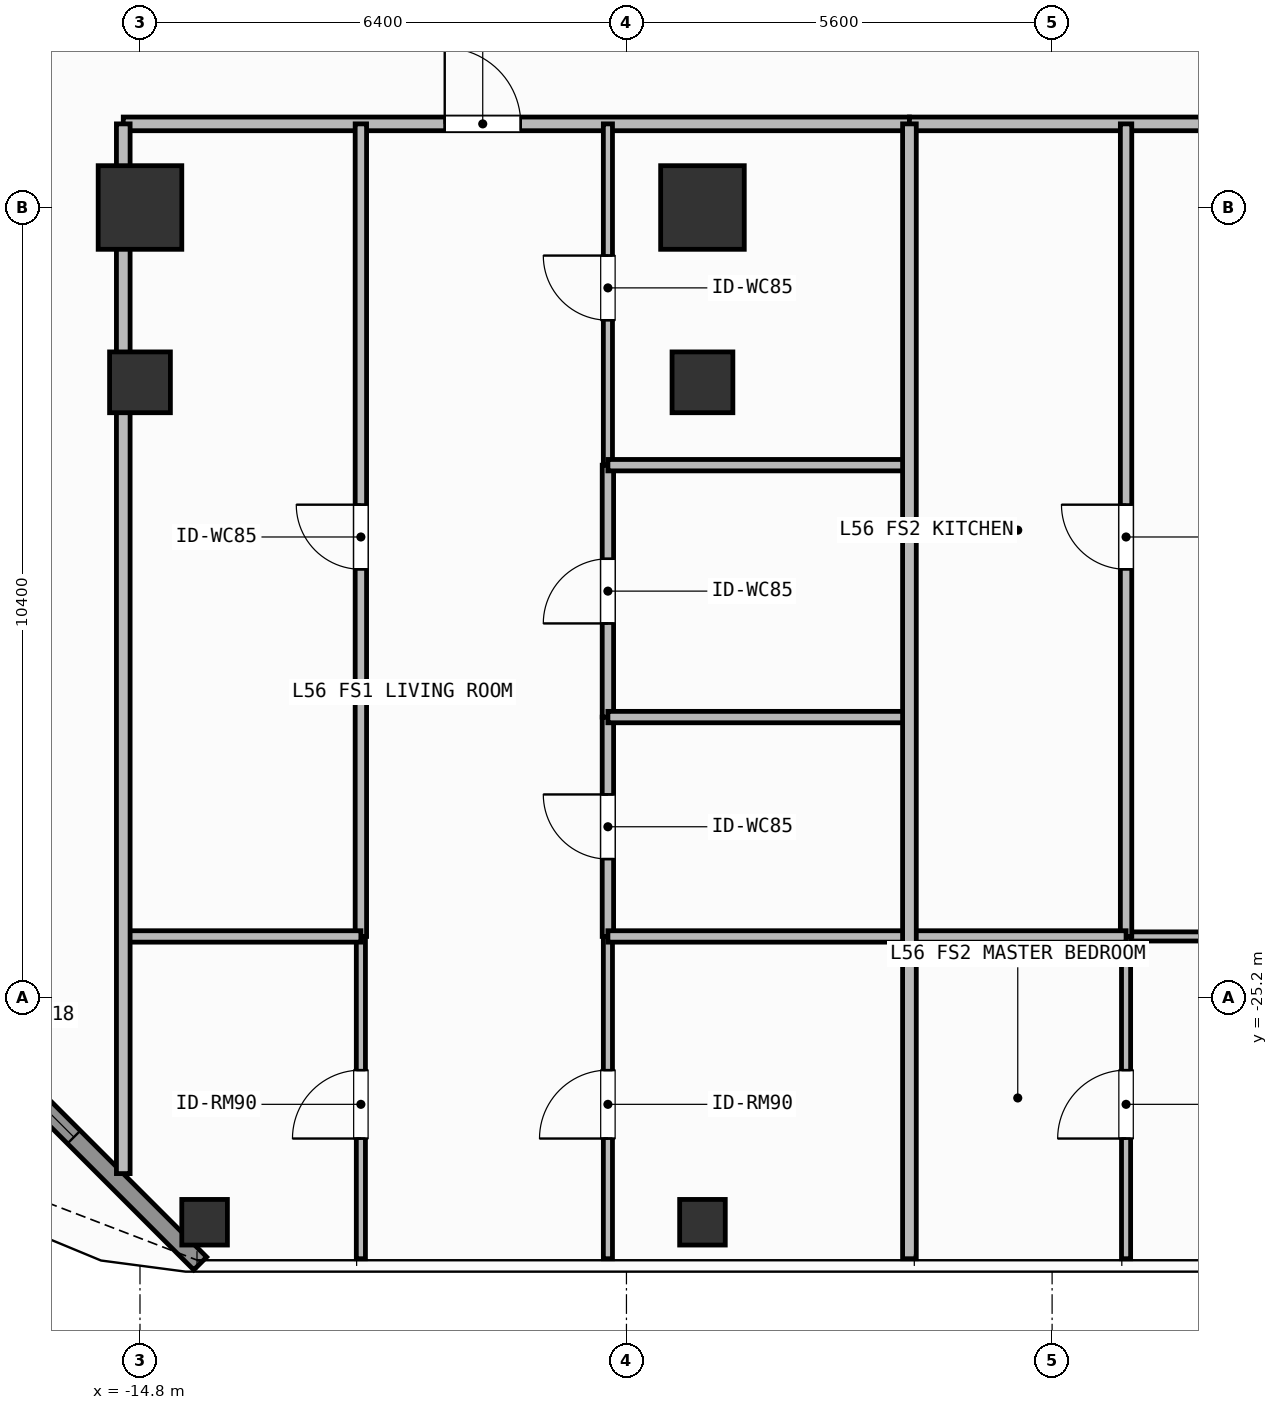
"""IFC4 building model, lengths in metres.
Left out: names, types, materials, properties, quantities, classifications, styles, units other than length and angle.
Written with IfcOpenShell. Run it as: python <this file> out.ifc"""

import sys

from ifc_helpers import new_model, si_unit, direction, frame, frame_2d, origin, origin_2d, place, context, subcontext, project, spatial, rectangle, hollow_rectangle, extrude, element, fill, save


model = new_model("IFC4")
c1 = context("Model", 3, precision=1e-05, world=origin(), true_north=direction((0.0, 1.0)))
c2 = subcontext(c1, "Body", "Model", "MODEL_VIEW")
j1 = project(units=[si_unit("LENGTHUNIT", "METRE"), si_unit("PLANEANGLEUNIT", "RADIAN")], contexts=[c1])
p1 = place(None, origin())
s1 = spatial("IfcSite", under=j1, at=p1, CompositionType="ELEMENT")
p2 = place(p1, origin())
s2 = spatial("IfcBuilding", under=s1, at=p2, CompositionType="ELEMENT")
p3 = place(p2, frame((0.0, 0.0, 227.4)))
s3 = spatial("IfcBuildingStorey", under=s2, at=p3, CompositionType="ELEMENT", Elevation=227.4)
for number, where, z_axis, x_axis in (
    (1, (-14.8, -14.8, 0.0), (0.0, 0.0, 1.0), (1.0, 0.0, 0.0)),
    (2, (-7.4, -14.8, 0.0), (0.0, 0.0, 1.0), (1.0, 0.0, 0.0)),
):
    element("IfcColumn", number, at=place(p3, frame(where, z_axis=z_axis, x_axis=x_axis)), inside=s3, PredefinedType="COLUMN", context=c2, shape_type="SweptSolid", body=[
        extrude(rectangle(XDim=1.1, YDim=1.1, at=origin_2d()), origin(), (0.0, 0.0, 1.0), 3.9),
    ])
for number, where, z_axis, x_axis in (
    (3, (-14.8, -17.1, 0.0), (0.0, 0.0, 1.0), (1.0, 0.0, 0.0)),
    (4, (-7.4, -17.1, 0.0), (0.0, 0.0, 1.0), (1.0, 0.0, 0.0)),
):
    element("IfcColumn", number, at=place(p3, frame(where, z_axis=z_axis, x_axis=x_axis)), inside=s3, PredefinedType="COLUMN", context=c2, shape_type="SweptSolid", body=[
        extrude(hollow_rectangle(XDim=0.8, YDim=0.8, WallThickness=0.036, at=origin_2d()), origin(), (0.0, 0.0, 1.0), 3.9),
    ])
for number, where, z_axis, x_axis in (
    (5, (-13.95, -28.15, 0.0), (0.0, 0.0, 1.0), (1.0, 0.0, 0.0)),
    (6, (-7.4, -28.15, 0.0), (0.0, 0.0, 1.0), (1.0, 0.0, 0.0)),
):
    element("IfcColumn", number, at=place(p3, frame(where, z_axis=z_axis, x_axis=x_axis)), inside=s3, PredefinedType="COLUMN", context=c2, shape_type="SweptSolid", body=[
        extrude(hollow_rectangle(XDim=0.6, YDim=0.6, WallThickness=0.028, at=origin_2d()), origin(), (0.0, 0.0, 1.0), 3.9),
    ])
p4 = place(p3, frame((-14.008, -28.692, 0.0), z_axis=(0.0, 0.0, 1.0), x_axis=(-0.707106781187, 0.707106781187, 0.0)))
e7 = element("IfcWall", 7, at=p4, inside=s3, PredefinedType="SOLIDWALL", context=c2, shape_type="SweptSolid", body=[
    extrude(rectangle(XDim=6.201, YDim=0.24, at=frame_2d((3.101, 0.0))), origin(), (0.0, 0.0, 1.0), 3.68),
])
p5 = place(p4, frame((2.351, 0.0, 0.8)))
e8 = element("IfcOpeningElement", 8, at=p5, cuts=e7, PredefinedType="OPENING", context=c2, shape_type="SweptSolid", body=[
    extrude(rectangle(XDim=1.5, YDim=1.85, at=frame_2d((0.75, 0.925))), frame((0.0, 0.13, 0.0), z_axis=(0.0, -1.0, 0.0), x_axis=(1.0, 0.0, 0.0)), (0.0, 0.0, 1.0), 0.26),
])
p6 = place(p3, frame((-15.02, -13.7, 0.0), z_axis=(0.0, 0.0, 1.0), x_axis=(1.0, 0.0, 0.0)))
e9 = element("IfcWall", 9, at=p6, inside=s3, PredefinedType="PARTITIONING", context=c2, shape_type="SweptSolid", body=[
    extrude(rectangle(XDim=10.343, YDim=0.18, at=frame_2d((5.171, 0.0))), origin(), (0.0, 0.0, 1.0), 3.68),
])
p7 = place(p6, frame((4.229, 0.0, 0.0)))
e10 = element("IfcOpeningElement", 10, at=p7, cuts=e9, PredefinedType="OPENING", context=c2, shape_type="SweptSolid", body=[
    extrude(rectangle(XDim=1.0, YDim=2.2, at=frame_2d((0.5, 1.1))), frame((0.0, 0.1, 0.0), z_axis=(0.0, -1.0, 0.0), x_axis=(1.0, 0.0, 0.0)), (0.0, 0.0, 1.0), 0.2),
])
p8 = place(p3, frame((-11.894, -24.39, 0.0), z_axis=(0.0, 0.0, 1.0), x_axis=(0.0, 1.0, 0.0)))
e11 = element("IfcWall", 11, at=p8, inside=s3, PredefinedType="PARTITIONING", context=c2, shape_type="SweptSolid", body=[
    extrude(rectangle(XDim=10.69, YDim=0.15, at=frame_2d((5.345, 0.0))), origin(), (0.0, 0.0, 1.0), 3.68),
])
p9 = place(p8, frame((4.83, 0.0, 0.0)))
e12 = element("IfcOpeningElement", 12, at=p9, cuts=e11, PredefinedType="OPENING", context=c2, shape_type="SweptSolid", body=[
    extrude(rectangle(XDim=0.85, YDim=2.1, at=frame_2d((0.425, 1.05))), frame((0.0, 0.085, 0.0), z_axis=(0.0, -1.0, 0.0), x_axis=(1.0, 0.0, 0.0)), (0.0, 0.0, 1.0), 0.17),
])
p10 = place(p3, frame((-11.894, -28.63, 0.0), z_axis=(0.0, 0.0, 1.0), x_axis=(0.0, 1.0, 0.0)))
e13 = element("IfcWall", 13, at=p10, inside=s3, PredefinedType="PARTITIONING", context=c2, shape_type="SweptSolid", body=[
    extrude(rectangle(XDim=4.24, YDim=0.12, at=frame_2d((2.12, 0.0))), origin(), (0.0, 0.0, 1.0), 3.68),
])
p11 = place(p10, frame((1.581, 0.0, 0.0)))
e14 = element("IfcOpeningElement", 14, at=p11, cuts=e13, PredefinedType="OPENING", context=c2, shape_type="SweptSolid", body=[
    extrude(rectangle(XDim=0.9, YDim=2.1, at=frame_2d((0.45, 1.05))), frame((0.0, 0.07, 0.0), z_axis=(0.0, -1.0, 0.0), x_axis=(1.0, 0.0, 0.0)), (0.0, 0.0, 1.0), 0.14),
])
p12 = place(p3, frame((-8.644, -24.39, 0.0), z_axis=(0.0, 0.0, 1.0), x_axis=(0.0, 1.0, 0.0)))
e15 = element("IfcWall", 15, at=p12, inside=s3, PredefinedType="PARTITIONING", context=c2, shape_type="SweptSolid", body=[
    extrude(rectangle(XDim=2.886, YDim=0.15, at=frame_2d((1.443, 0.0))), origin(), (0.0, 0.0, 1.0), 3.68),
])
p13 = place(p12, frame((1.018, 0.0, 0.0)))
e16 = element("IfcOpeningElement", 16, at=p13, cuts=e15, PredefinedType="OPENING", context=c2, shape_type="SweptSolid", body=[
    extrude(rectangle(XDim=0.85, YDim=2.1, at=frame_2d((0.425, 1.05))), frame((0.0, 0.085, 0.0), z_axis=(0.0, -1.0, 0.0), x_axis=(1.0, 0.0, 0.0)), (0.0, 0.0, 1.0), 0.17),
])
p14 = place(p3, frame((-8.644, -21.504, 0.0), z_axis=(0.0, 0.0, 1.0), x_axis=(0.0, 1.0, 0.0)))
e17 = element("IfcWall", 17, at=p14, inside=s3, PredefinedType="PARTITIONING", context=c2, shape_type="SweptSolid", body=[
    extrude(rectangle(XDim=3.314, YDim=0.15, at=frame_2d((1.657, 0.0))), origin(), (0.0, 0.0, 1.0), 3.68),
])
p15 = place(p14, frame((1.232, 0.0, 0.0)))
e18 = element("IfcOpeningElement", 18, at=p15, cuts=e17, PredefinedType="OPENING", context=c2, shape_type="SweptSolid", body=[
    extrude(rectangle(XDim=0.85, YDim=2.1, at=frame_2d((0.425, 1.05))), frame((0.0, 0.085, 0.0), z_axis=(0.0, -1.0, 0.0), x_axis=(1.0, 0.0, 0.0)), (0.0, 0.0, 1.0), 0.17),
])
p16 = place(p3, frame((-8.644, -18.19, 0.0), z_axis=(0.0, 0.0, 1.0), x_axis=(0.0, 1.0, 0.0)))
e19 = element("IfcWall", 19, at=p16, inside=s3, PredefinedType="PARTITIONING", context=c2, shape_type="SweptSolid", body=[
    extrude(rectangle(XDim=4.49, YDim=0.12, at=frame_2d((2.245, 0.0))), origin(), (0.0, 0.0, 1.0), 3.68),
])
p17 = place(p16, frame((1.907, 0.0, 0.0)))
e20 = element("IfcOpeningElement", 20, at=p17, cuts=e19, PredefinedType="OPENING", context=c2, shape_type="SweptSolid", body=[
    extrude(rectangle(XDim=0.85, YDim=2.1, at=frame_2d((0.425, 1.05))), frame((0.0, 0.07, 0.0), z_axis=(0.0, -1.0, 0.0), x_axis=(1.0, 0.0, 0.0)), (0.0, 0.0, 1.0), 0.14),
])
p18 = place(p3, frame((-8.644, -28.63, 0.0), z_axis=(0.0, 0.0, 1.0), x_axis=(0.0, 1.0, 0.0)))
e21 = element("IfcWall", 21, at=p18, inside=s3, PredefinedType="PARTITIONING", context=c2, shape_type="SweptSolid", body=[
    extrude(rectangle(XDim=4.24, YDim=0.12, at=frame_2d((2.12, 0.0))), origin(), (0.0, 0.0, 1.0), 3.68),
])
p19 = place(p18, frame((1.581, 0.0, 0.0)))
e22 = element("IfcOpeningElement", 22, at=p19, cuts=e21, PredefinedType="OPENING", context=c2, shape_type="SweptSolid", body=[
    extrude(rectangle(XDim=0.9, YDim=2.1, at=frame_2d((0.45, 1.05))), frame((0.0, 0.07, 0.0), z_axis=(0.0, -1.0, 0.0), x_axis=(1.0, 0.0, 0.0)), (0.0, 0.0, 1.0), 0.14),
])
p20 = place(p3, frame((-4.677, -13.7, 0.0), z_axis=(0.0, 0.0, 1.0), x_axis=(1.0, 0.0, 0.0)))
e23 = element("IfcWall", 23, at=p20, inside=s3, PredefinedType="PARTITIONING", context=c2, shape_type="SweptSolid", body=[
    extrude(rectangle(XDim=15.905, YDim=0.18, at=frame_2d((7.953, 0.0))), origin(), (0.0, 0.0, 1.0), 3.68),
])
p21 = place(p20, frame((6.03, 0.0, 0.0)))
e24 = element("IfcOpeningElement", 24, at=p21, cuts=e23, PredefinedType="OPENING", context=c2, shape_type="SweptSolid", body=[
    extrude(rectangle(XDim=1.0, YDim=2.2, at=frame_2d((0.5, 1.1))), frame((0.0, 0.1, 0.0), z_axis=(0.0, -1.0, 0.0), x_axis=(1.0, 0.0, 0.0)), (0.0, 0.0, 1.0), 0.2),
])
p22 = place(p3, frame((-1.827, -24.39, 0.0), z_axis=(0.0, 0.0, 1.0), x_axis=(1.0, 0.0, 0.0)))
e25 = element("IfcWall", 25, at=p22, inside=s3, PredefinedType="PARTITIONING", context=c2, shape_type="SweptSolid", body=[
    extrude(rectangle(XDim=7.252, YDim=0.12, at=frame_2d((3.626, 0.0))), origin(), (0.0, 0.0, 1.0), 3.68),
])
p23 = place(p22, frame((3.176, 0.0, 0.0)))
e26 = element("IfcOpeningElement", 26, at=p23, cuts=e25, PredefinedType="OPENING", context=c2, shape_type="SweptSolid", body=[
    extrude(rectangle(XDim=0.9, YDim=2.1, at=frame_2d((0.45, 1.05))), frame((0.0, 0.07, 0.0), z_axis=(0.0, -1.0, 0.0), x_axis=(1.0, 0.0, 0.0)), (0.0, 0.0, 1.0), 0.14),
])
p24 = place(p3, frame((-1.827, -24.39, 0.0), z_axis=(0.0, 0.0, 1.0), x_axis=(0.0, 1.0, 0.0)))
e27 = element("IfcWall", 27, at=p24, inside=s3, PredefinedType="PARTITIONING", context=c2, shape_type="SweptSolid", body=[
    extrude(rectangle(XDim=10.69, YDim=0.15, at=frame_2d((5.345, 0.0))), origin(), (0.0, 0.0, 1.0), 3.68),
])
p25 = place(p24, frame((4.83, 0.0, 0.0)))
e28 = element("IfcOpeningElement", 28, at=p25, cuts=e27, PredefinedType="OPENING", context=c2, shape_type="SweptSolid", body=[
    extrude(rectangle(XDim=0.85, YDim=2.1, at=frame_2d((0.425, 1.05))), frame((0.0, 0.085, 0.0), z_axis=(0.0, -1.0, 0.0), x_axis=(1.0, 0.0, 0.0)), (0.0, 0.0, 1.0), 0.17),
])
p26 = place(p3, frame((-1.827, -28.63, 0.0), z_axis=(0.0, 0.0, 1.0), x_axis=(0.0, 1.0, 0.0)))
e29 = element("IfcWall", 29, at=p26, inside=s3, PredefinedType="PARTITIONING", context=c2, shape_type="SweptSolid", body=[
    extrude(rectangle(XDim=4.24, YDim=0.12, at=frame_2d((2.12, 0.0))), origin(), (0.0, 0.0, 1.0), 3.68),
])
p27 = place(p26, frame((1.581, 0.0, 0.0)))
e30 = element("IfcOpeningElement", 30, at=p27, cuts=e29, PredefinedType="OPENING", context=c2, shape_type="SweptSolid", body=[
    extrude(rectangle(XDim=0.9, YDim=2.1, at=frame_2d((0.45, 1.05))), frame((0.0, 0.07, 0.0), z_axis=(0.0, -1.0, 0.0), x_axis=(1.0, 0.0, 0.0)), (0.0, 0.0, 1.0), 0.14),
])
p28 = place(p3, frame((-15.02, -24.39, 0.0), z_axis=(0.0, 0.0, 1.0), x_axis=(1.0, 0.0, 0.0)))
e31 = element("IfcWall", 31, at=p28, inside=s3, PredefinedType="PARTITIONING", context=c2, shape_type="SweptSolid", body=[
    extrude(rectangle(XDim=3.126, YDim=0.15, at=frame_2d((1.563, 0.0))), origin(), (0.0, 0.0, 1.0), 3.68),
])
for number, where, z_axis, x_axis in (
    (32, (-8.644, -21.504, 0.0), (0.0, 0.0, 1.0), (1.0, 0.0, 0.0)),
    (33, (-8.644, -18.19, 0.0), (0.0, 0.0, 1.0), (1.0, 0.0, 0.0)),
    (34, (-8.644, -24.39, 0.0), (0.0, 0.0, 1.0), (1.0, 0.0, 0.0)),
):
    element("IfcWall", number, at=place(p3, frame(where, z_axis=z_axis, x_axis=x_axis)), inside=s3, PredefinedType="PARTITIONING", context=c2, shape_type="SweptSolid", body=[
        extrude(rectangle(XDim=3.967, YDim=0.15, at=frame_2d((1.983, 0.0))), origin(), (0.0, 0.0, 1.0), 3.68),
    ])
p29 = place(p3, frame((-4.677, -24.39, 0.0), z_axis=(0.0, 0.0, 1.0), x_axis=(1.0, 0.0, 0.0)))
e35 = element("IfcWall", 35, at=p29, inside=s3, PredefinedType="PARTITIONING", context=c2, shape_type="SweptSolid", body=[
    extrude(rectangle(XDim=2.85, YDim=0.15, at=frame_2d((1.425, 0.0))), origin(), (0.0, 0.0, 1.0), 3.68),
])
p30 = place(p3, frame((-4.677, -28.63, 0.0), z_axis=(0.0, 0.0, 1.0), x_axis=(0.0, 1.0, 0.0)))
e36 = element("IfcWall", 36, at=p30, inside=s3, PredefinedType="PARTITIONING", context=c2, shape_type="SweptSolid", body=[
    extrude(rectangle(XDim=14.93, YDim=0.18, at=frame_2d((7.465, 0.0))), origin(), (0.0, 0.0, 1.0), 3.68),
])
p31 = place(p3, frame((-15.02, -27.51, 0.0), z_axis=(0.0, 0.0, 1.0), x_axis=(0.0, 1.0, 0.0)))
e37 = element("IfcWall", 37, at=p31, inside=s3, PredefinedType="PARTITIONING", context=c2, shape_type="SweptSolid", body=[
    extrude(rectangle(XDim=13.81, YDim=0.18, at=frame_2d((6.905, 0.0))), origin(), (0.0, 0.0, 1.0), 3.68),
])
p32 = place(p5, origin())
e38 = element("IfcWindow", 38, at=p32, inside=s3, PartitioningType="SINGLE_PANEL", PredefinedType="WINDOW", context=c2, shape_type="SweptSolid", body=[
    extrude(rectangle(XDim=1.5, YDim=1.85, at=frame_2d((0.75, 0.925))), frame((0.0, 0.03, 0.0), z_axis=(0.0, -1.0, 0.0), x_axis=(1.0, 0.0, 0.0)), (0.0, 0.0, 1.0), 0.06),
])
fill(e8, e38)
p33 = place(p7, origin())
e39 = element("IfcDoor", 39, at=p33, inside=s3, OperationType="SINGLE_SWING_LEFT", PredefinedType="DOOR", context=c2, shape_type="SweptSolid", body=[
    extrude(rectangle(XDim=1.0, YDim=2.2, at=frame_2d((0.5, 1.1))), frame((0.0, 0.025, 0.0), z_axis=(0.0, -1.0, 0.0), x_axis=(1.0, 0.0, 0.0)), (0.0, 0.0, 1.0), 0.05),
])
fill(e10, e39)
p34 = place(p9, origin())
e40 = element("IfcDoor", 40, at=p34, inside=s3, OperationType="SINGLE_SWING_RIGHT", PredefinedType="DOOR", context=c2, shape_type="SweptSolid", body=[
    extrude(rectangle(XDim=0.85, YDim=2.1, at=frame_2d((0.425, 1.05))), frame((0.0, 0.025, 0.0), z_axis=(0.0, -1.0, 0.0), x_axis=(1.0, 0.0, 0.0)), (0.0, 0.0, 1.0), 0.05),
])
fill(e12, e40)
p35 = place(p11, origin())
e41 = element("IfcDoor", 41, at=p35, inside=s3, OperationType="SINGLE_SWING_LEFT", PredefinedType="DOOR", context=c2, shape_type="SweptSolid", body=[
    extrude(rectangle(XDim=0.9, YDim=2.1, at=frame_2d((0.45, 1.05))), frame((0.0, 0.025, 0.0), z_axis=(0.0, -1.0, 0.0), x_axis=(1.0, 0.0, 0.0)), (0.0, 0.0, 1.0), 0.05),
])
fill(e14, e41)
p36 = place(p13, origin())
e42 = element("IfcDoor", 42, at=p36, inside=s3, OperationType="SINGLE_SWING_RIGHT", PredefinedType="DOOR", context=c2, shape_type="SweptSolid", body=[
    extrude(rectangle(XDim=0.85, YDim=2.1, at=frame_2d((0.425, 1.05))), frame((0.0, 0.025, 0.0), z_axis=(0.0, -1.0, 0.0), x_axis=(1.0, 0.0, 0.0)), (0.0, 0.0, 1.0), 0.05),
])
fill(e16, e42)
p37 = place(p15, origin())
e43 = element("IfcDoor", 43, at=p37, inside=s3, OperationType="SINGLE_SWING_LEFT", PredefinedType="DOOR", context=c2, shape_type="SweptSolid", body=[
    extrude(rectangle(XDim=0.85, YDim=2.1, at=frame_2d((0.425, 1.05))), frame((0.0, 0.025, 0.0), z_axis=(0.0, -1.0, 0.0), x_axis=(1.0, 0.0, 0.0)), (0.0, 0.0, 1.0), 0.05),
])
fill(e18, e43)
p38 = place(p17, origin())
e44 = element("IfcDoor", 44, at=p38, inside=s3, OperationType="SINGLE_SWING_RIGHT", PredefinedType="DOOR", context=c2, shape_type="SweptSolid", body=[
    extrude(rectangle(XDim=0.85, YDim=2.1, at=frame_2d((0.425, 1.05))), frame((0.0, 0.025, 0.0), z_axis=(0.0, -1.0, 0.0), x_axis=(1.0, 0.0, 0.0)), (0.0, 0.0, 1.0), 0.05),
])
fill(e20, e44)
p39 = place(p19, origin())
e45 = element("IfcDoor", 45, at=p39, inside=s3, OperationType="SINGLE_SWING_LEFT", PredefinedType="DOOR", context=c2, shape_type="SweptSolid", body=[
    extrude(rectangle(XDim=0.9, YDim=2.1, at=frame_2d((0.45, 1.05))), frame((0.0, 0.025, 0.0), z_axis=(0.0, -1.0, 0.0), x_axis=(1.0, 0.0, 0.0)), (0.0, 0.0, 1.0), 0.05),
])
fill(e22, e45)
p40 = place(p25, origin())
e46 = element("IfcDoor", 46, at=p40, inside=s3, OperationType="SINGLE_SWING_RIGHT", PredefinedType="DOOR", context=c2, shape_type="SweptSolid", body=[
    extrude(rectangle(XDim=0.85, YDim=2.1, at=frame_2d((0.425, 1.05))), frame((0.0, 0.025, 0.0), z_axis=(0.0, -1.0, 0.0), x_axis=(1.0, 0.0, 0.0)), (0.0, 0.0, 1.0), 0.05),
])
fill(e28, e46)
p41 = place(p27, origin())
e47 = element("IfcDoor", 47, at=p41, inside=s3, OperationType="SINGLE_SWING_LEFT", PredefinedType="DOOR", context=c2, shape_type="SweptSolid", body=[
    extrude(rectangle(XDim=0.9, YDim=2.1, at=frame_2d((0.45, 1.05))), frame((0.0, 0.025, 0.0), z_axis=(0.0, -1.0, 0.0), x_axis=(1.0, 0.0, 0.0)), (0.0, 0.0, 1.0), 0.05),
])
fill(e30, e47)
save(model, sys.argv[1])
